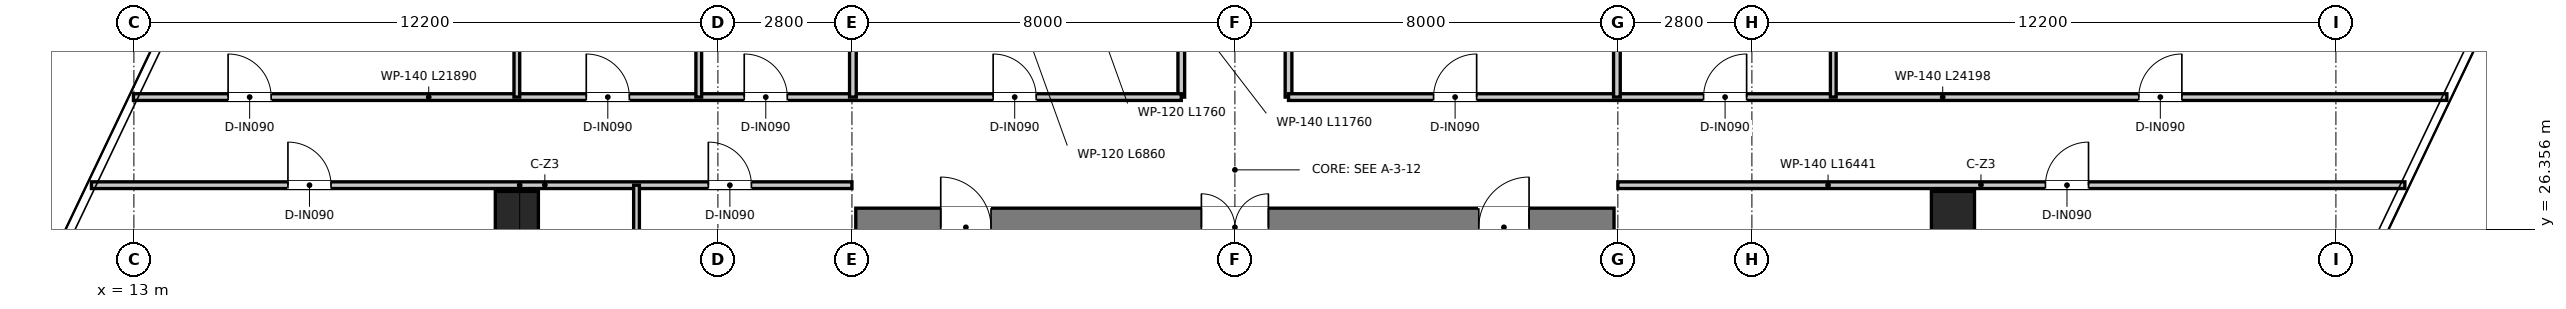
"""IFC4 building model, lengths in metres.
Left out: names, types, materials, properties, quantities, classifications, styles, units other than length and angle.
Written with IfcOpenShell. Run it as: python <this file> out.ifc"""

import sys

from ifc_helpers import new_model, si_unit, direction, frame, frame_2d, origin, origin_2d, place, context, subcontext, project, spatial, rectangle, extrude, source, transform, mapped, element, fill, save


model = new_model("IFC4")
c1 = context("Model", 3, precision=1e-05, world=origin(), true_north=direction((0.0, 1.0)))
c2 = subcontext(c1, "Body", "Model", "MODEL_VIEW")
j1 = project(units=[si_unit("LENGTHUNIT", "METRE"), si_unit("PLANEANGLEUNIT", "RADIAN")], contexts=[c1])
p1 = place(None, origin())
s1 = spatial("IfcSite", under=j1, at=p1, CompositionType="ELEMENT")
p2 = place(p1, origin())
s2 = spatial("IfcBuilding", under=s1, at=p2, CompositionType="ELEMENT")
p3 = place(p2, frame((0.0, 0.0, 146.2)))
s3 = spatial("IfcBuildingStorey", under=s2, at=p3, CompositionType="ELEMENT", Elevation=146.2)
p4 = place(p3, frame((28.08, 26.4, 0.0), z_axis=(0.0, 0.0, 1.0), x_axis=(1.0, 0.0, 0.0)))
e1 = element("IfcWall", 1, at=p4, inside=s3, PredefinedType="SHEAR", context=c2, shape_type="SweptSolid", body=[
    extrude(rectangle(XDim=15.84, YDim=0.8, at=frame_2d((7.92, 0.0))), origin(), (0.0, 0.0, 1.0), 3.95),
])
p5 = place(p4, frame((7.22, 0.0, 0.0)))
e2 = element("IfcOpeningElement", 2, at=p5, cuts=e1, PredefinedType="OPENING", context=c2, shape_type="SweptSolid", body=[
    extrude(rectangle(XDim=1.4, YDim=2.2, at=frame_2d((0.7, 1.1))), frame((0.0, 0.41, 0.0), z_axis=(0.0, -1.0, 0.0), x_axis=(1.0, 0.0, 0.0)), (0.0, 0.0, 1.0), 0.82),
])
p6 = place(p4, frame((1.775, 0.0, 0.0)))
e3 = element("IfcOpeningElement", 3, at=p6, cuts=e1, PredefinedType="OPENING", context=c2, shape_type="SweptSolid", body=[
    extrude(rectangle(XDim=1.05, YDim=2.1, at=frame_2d((0.525, 1.05))), frame((0.0, 0.41, 0.0), z_axis=(0.0, -1.0, 0.0), x_axis=(1.0, 0.0, 0.0)), (0.0, 0.0, 1.0), 0.82),
])
p7 = place(p4, frame((13.015, 0.0, 0.0)))
e4 = element("IfcOpeningElement", 4, at=p7, cuts=e1, PredefinedType="OPENING", context=c2, shape_type="SweptSolid", body=[
    extrude(rectangle(XDim=1.05, YDim=2.1, at=frame_2d((0.525, 1.05))), frame((0.0, 0.41, 0.0), z_axis=(0.0, -1.0, 0.0), x_axis=(1.0, 0.0, 0.0)), (0.0, 0.0, 1.0), 0.82),
])
m1 = source(origin(), c2, "Body", "SweptSolid", [
    extrude(rectangle(XDim=0.9, YDim=0.9, at=origin_2d()), origin(), (0.0, 0.0, 1.0), 3.95),
])
for number, where, z_axis, x_axis in (
    (5, (21.0, 26.7, 0.0), (0.0, 0.0, 1.0), (1.0, 0.0, 0.0)),
    (6, (51.0, 26.7, 0.0), (0.0, 0.0, 1.0), (1.0, 0.0, 0.0)),
):
    element("IfcColumn", number, at=place(p3, frame(where, z_axis=z_axis, x_axis=x_axis)), inside=s3, PredefinedType="COLUMN", context=c2, shape_type="MappedRepresentation", body=[
        mapped(m1, transform((0.0, 0.0, 0.0), x_axis=(1.0, 0.0, 0.0), y_axis=(0.0, 1.0, 0.0), z_axis=(0.0, 0.0, 1.0), scale=1.0)),
    ])
p8 = place(p3, frame((34.88, 29.12, 0.0), z_axis=(0.0, 0.0, 1.0), x_axis=(0.0, 1.0, 0.0)))
e7 = element("IfcWall", 7, at=p8, inside=s3, PredefinedType="PARTITIONING", context=c2, shape_type="SweptSolid", body=[
    extrude(rectangle(XDim=11.76, YDim=0.14, at=frame_2d((5.88, 0.0))), origin(), (0.0, 0.0, 1.0), 3.03),
])
p9 = place(p8, frame((4.085, 0.0, 0.0)))
e8 = element("IfcOpeningElement", 8, at=p9, cuts=e7, PredefinedType="OPENING", context=c2, shape_type="SweptSolid", body=[
    extrude(rectangle(XDim=0.95, YDim=2.1, at=frame_2d((0.475, 1.05))), frame((0.0, 0.08, 0.0), z_axis=(0.0, -1.0, 0.0), x_axis=(1.0, 0.0, 0.0)), (0.0, 0.0, 1.0), 0.16),
])
p10 = place(p8, frame((6.82, 0.0, 0.0)))
e9 = element("IfcOpeningElement", 9, at=p10, cuts=e7, PredefinedType="OPENING", context=c2, shape_type="SweptSolid", body=[
    extrude(rectangle(XDim=0.9, YDim=2.1, at=frame_2d((0.45, 1.05))), frame((0.0, 0.08, 0.0), z_axis=(0.0, -1.0, 0.0), x_axis=(1.0, 0.0, 0.0)), (0.0, 0.0, 1.0), 0.16),
])
p11 = place(p8, frame((9.83, 0.0, 0.0)))
e10 = element("IfcOpeningElement", 10, at=p11, cuts=e7, PredefinedType="OPENING", context=c2, shape_type="SweptSolid", body=[
    extrude(rectangle(XDim=0.9, YDim=2.1, at=frame_2d((0.45, 1.05))), frame((0.0, 0.08, 0.0), z_axis=(0.0, -1.0, 0.0), x_axis=(1.0, 0.0, 0.0)), (0.0, 0.0, 1.0), 0.16),
])
p12 = place(p3, frame((37.12, 29.12, 0.0), z_axis=(0.0, 0.0, 1.0), x_axis=(0.0, 1.0, 0.0)))
e11 = element("IfcWall", 11, at=p12, inside=s3, PredefinedType="PARTITIONING", context=c2, shape_type="SweptSolid", body=[
    extrude(rectangle(XDim=11.76, YDim=0.14, at=frame_2d((5.88, 0.0))), origin(), (0.0, 0.0, 1.0), 3.03),
])
p13 = place(p12, frame((3.205, 0.0, 0.0)))
e12 = element("IfcOpeningElement", 12, at=p13, cuts=e11, PredefinedType="OPENING", context=c2, shape_type="SweptSolid", body=[
    extrude(rectangle(XDim=0.95, YDim=2.1, at=frame_2d((0.475, 1.05))), frame((0.0, 0.08, 0.0), z_axis=(0.0, -1.0, 0.0), x_axis=(1.0, 0.0, 0.0)), (0.0, 0.0, 1.0), 0.16),
])
p14 = place(p12, frame((6.82, 0.0, 0.0)))
e13 = element("IfcOpeningElement", 13, at=p14, cuts=e11, PredefinedType="OPENING", context=c2, shape_type="SweptSolid", body=[
    extrude(rectangle(XDim=0.9, YDim=2.1, at=frame_2d((0.45, 1.05))), frame((0.0, 0.08, 0.0), z_axis=(0.0, -1.0, 0.0), x_axis=(1.0, 0.0, 0.0)), (0.0, 0.0, 1.0), 0.16),
])
p15 = place(p12, frame((9.83, 0.0, 0.0)))
e14 = element("IfcOpeningElement", 14, at=p15, cuts=e11, PredefinedType="OPENING", context=c2, shape_type="SweptSolid", body=[
    extrude(rectangle(XDim=0.9, YDim=2.1, at=frame_2d((0.45, 1.05))), frame((0.0, 0.08, 0.0), z_axis=(0.0, -1.0, 0.0), x_axis=(1.0, 0.0, 0.0)), (0.0, 0.0, 1.0), 0.16),
])
p16 = place(p3, frame((12.99, 29.12, 0.0), z_axis=(0.0, 0.0, 1.0), x_axis=(1.0, 0.0, 0.0)))
e15 = element("IfcWall", 15, at=p16, inside=s3, PredefinedType="PARTITIONING", context=c2, shape_type="SweptSolid", body=[
    extrude(rectangle(XDim=21.889, YDim=0.14, at=frame_2d((10.945, 0.0))), origin(), (0.0, 0.0, 1.0), 3.03),
])
p17 = place(p16, frame((17.96, 0.0, 0.0)))
e16 = element("IfcOpeningElement", 16, at=p17, cuts=e15, PredefinedType="OPENING", context=c2, shape_type="SweptSolid", body=[
    extrude(rectangle(XDim=0.9, YDim=2.1, at=frame_2d((0.45, 1.05))), frame((0.0, 0.08, 0.0), z_axis=(0.0, -1.0, 0.0), x_axis=(1.0, 0.0, 0.0)), (0.0, 0.0, 1.0), 0.16),
])
p18 = place(p16, frame((1.978, 0.0, 0.0)))
e17 = element("IfcOpeningElement", 17, at=p18, cuts=e15, PredefinedType="OPENING", context=c2, shape_type="SweptSolid", body=[
    extrude(rectangle(XDim=0.9, YDim=2.1, at=frame_2d((0.45, 1.05))), frame((0.0, 0.08, 0.0), z_axis=(0.0, -1.0, 0.0), x_axis=(1.0, 0.0, 0.0)), (0.0, 0.0, 1.0), 0.16),
])
p19 = place(p16, frame((9.46, 0.0, 0.0)))
e18 = element("IfcOpeningElement", 18, at=p19, cuts=e15, PredefinedType="OPENING", context=c2, shape_type="SweptSolid", body=[
    extrude(rectangle(XDim=0.9, YDim=2.1, at=frame_2d((0.45, 1.05))), frame((0.0, 0.08, 0.0), z_axis=(0.0, -1.0, 0.0), x_axis=(1.0, 0.0, 0.0)), (0.0, 0.0, 1.0), 0.16),
])
p20 = place(p16, frame((12.76, 0.0, 0.0)))
e19 = element("IfcOpeningElement", 19, at=p20, cuts=e15, PredefinedType="OPENING", context=c2, shape_type="SweptSolid", body=[
    extrude(rectangle(XDim=0.9, YDim=2.1, at=frame_2d((0.45, 1.05))), frame((0.0, 0.08, 0.0), z_axis=(0.0, -1.0, 0.0), x_axis=(1.0, 0.0, 0.0)), (0.0, 0.0, 1.0), 0.16),
])
p21 = place(p3, frame((37.12, 29.12, 0.0), z_axis=(0.0, 0.0, 1.0), x_axis=(1.0, 0.0, 0.0)))
e20 = element("IfcWall", 20, at=p21, inside=s3, PredefinedType="PARTITIONING", context=c2, shape_type="SweptSolid", body=[
    extrude(rectangle(XDim=24.198, YDim=0.14, at=frame_2d((12.099, 0.0))), origin(), (0.0, 0.0, 1.0), 3.03),
])
p22 = place(p21, frame((3.03, 0.0, 0.0)))
e21 = element("IfcOpeningElement", 21, at=p22, cuts=e20, PredefinedType="OPENING", context=c2, shape_type="SweptSolid", body=[
    extrude(rectangle(XDim=0.9, YDim=2.1, at=frame_2d((0.45, 1.05))), frame((0.0, 0.08, 0.0), z_axis=(0.0, -1.0, 0.0), x_axis=(1.0, 0.0, 0.0)), (0.0, 0.0, 1.0), 0.16),
])
p23 = place(p21, frame((8.67, 0.0, 0.0)))
e22 = element("IfcOpeningElement", 22, at=p23, cuts=e20, PredefinedType="OPENING", context=c2, shape_type="SweptSolid", body=[
    extrude(rectangle(XDim=0.9, YDim=2.1, at=frame_2d((0.45, 1.05))), frame((0.0, 0.08, 0.0), z_axis=(0.0, -1.0, 0.0), x_axis=(1.0, 0.0, 0.0)), (0.0, 0.0, 1.0), 0.16),
])
p24 = place(p21, frame((17.762, 0.0, 0.0)))
e23 = element("IfcOpeningElement", 23, at=p24, cuts=e20, PredefinedType="OPENING", context=c2, shape_type="SweptSolid", body=[
    extrude(rectangle(XDim=0.9, YDim=2.1, at=frame_2d((0.45, 1.05))), frame((0.0, 0.08, 0.0), z_axis=(0.0, -1.0, 0.0), x_axis=(1.0, 0.0, 0.0)), (0.0, 0.0, 1.0), 0.16),
])
p25 = place(p3, frame((12.113, 27.28, 0.0), z_axis=(0.0, 0.0, 1.0), x_axis=(1.0, 0.0, 0.0)))
e24 = element("IfcWall", 24, at=p25, inside=s3, PredefinedType="PARTITIONING", context=c2, shape_type="SweptSolid", body=[
    extrude(rectangle(XDim=15.887, YDim=0.14, at=frame_2d((7.944, 0.0))), origin(), (0.0, 0.0, 1.0), 3.03),
])
p26 = place(p25, frame((4.105, 0.0, 0.0)))
e25 = element("IfcOpeningElement", 25, at=p26, cuts=e24, PredefinedType="OPENING", context=c2, shape_type="SweptSolid", body=[
    extrude(rectangle(XDim=0.9, YDim=2.1, at=frame_2d((0.45, 1.05))), frame((0.0, 0.08, 0.0), z_axis=(0.0, -1.0, 0.0), x_axis=(1.0, 0.0, 0.0)), (0.0, 0.0, 1.0), 0.16),
])
p27 = place(p25, frame((12.887, 0.0, 0.0)))
e26 = element("IfcOpeningElement", 26, at=p27, cuts=e24, PredefinedType="OPENING", context=c2, shape_type="SweptSolid", body=[
    extrude(rectangle(XDim=0.9, YDim=2.1, at=frame_2d((0.45, 1.05))), frame((0.0, 0.08, 0.0), z_axis=(0.0, -1.0, 0.0), x_axis=(1.0, 0.0, 0.0)), (0.0, 0.0, 1.0), 0.16),
])
p28 = place(p3, frame((44.0, 27.28, 0.0), z_axis=(0.0, 0.0, 1.0), x_axis=(1.0, 0.0, 0.0)))
e27 = element("IfcWall", 27, at=p28, inside=s3, PredefinedType="PARTITIONING", context=c2, shape_type="SweptSolid", body=[
    extrude(rectangle(XDim=16.441, YDim=0.14, at=frame_2d((8.22, 0.0))), origin(), (0.0, 0.0, 1.0), 3.03),
])
p29 = place(p28, frame((8.932, 0.0, 0.0)))
e28 = element("IfcOpeningElement", 28, at=p29, cuts=e27, PredefinedType="OPENING", context=c2, shape_type="SweptSolid", body=[
    extrude(rectangle(XDim=0.9, YDim=2.1, at=frame_2d((0.45, 1.05))), frame((0.0, 0.08, 0.0), z_axis=(0.0, -1.0, 0.0), x_axis=(1.0, 0.0, 0.0)), (0.0, 0.0, 1.0), 0.16),
])
for number, where, z_axis, x_axis in (
    (29, (28.02, 29.12, 0.0), (0.0, 0.0, 1.0), (0.0, 1.0, 0.0)),
    (30, (43.98, 29.12, 0.0), (0.0, 0.0, 1.0), (0.0, 1.0, 0.0)),
):
    element("IfcWall", number, at=place(p3, frame(where, z_axis=z_axis, x_axis=x_axis)), inside=s3, PredefinedType="PARTITIONING", context=c2, shape_type="SweptSolid", body=[
        extrude(rectangle(XDim=5.46, YDim=0.14, at=frame_2d((2.73, 0.0))), origin(), (0.0, 0.0, 1.0), 3.31),
    ])
p30 = place(p3, frame((21.0, 29.12, 0.0), z_axis=(0.0, 0.0, 1.0), x_axis=(0.0, 1.0, 0.0)))
e31 = element("IfcWall", 31, at=p30, inside=s3, PredefinedType="PARTITIONING", context=c2, shape_type="SweptSolid", body=[
    extrude(rectangle(XDim=16.792, YDim=0.12, at=frame_2d((8.396, 0.0))), origin(), (0.0, 0.0, 1.0), 3.08),
])
p31 = place(p3, frame((24.8, 29.12, 0.0), z_axis=(0.0, 0.0, 1.0), x_axis=(0.0, 1.0, 0.0)))
e32 = element("IfcWall", 32, at=p31, inside=s3, PredefinedType="PARTITIONING", context=c2, shape_type="SweptSolid", body=[
    extrude(rectangle(XDim=21.951, YDim=0.12, at=frame_2d((10.975, 0.0))), origin(), (0.0, 0.0, 1.0), 3.08),
])
p32 = place(p3, frame((48.5, 29.12, 0.0), z_axis=(0.0, 0.0, 1.0), x_axis=(0.0, 1.0, 0.0)))
e33 = element("IfcWall", 33, at=p32, inside=s3, PredefinedType="PARTITIONING", context=c2, shape_type="SweptSolid", body=[
    extrude(rectangle(XDim=15.781, YDim=0.12, at=frame_2d((7.891, 0.0))), origin(), (0.0, 0.0, 1.0), 3.08),
])
p33 = place(p3, frame((23.5, 8.498, 0.0), z_axis=(0.0, 0.0, 1.0), x_axis=(0.0, 1.0, 0.0)))
e34 = element("IfcWall", 34, at=p33, inside=s3, PredefinedType="PARTITIONING", context=c2, shape_type="SweptSolid", body=[
    extrude(rectangle(XDim=18.782, YDim=0.12, at=frame_2d((9.391, 0.0))), origin(), (0.0, 0.0, 1.0), 3.08),
])
p34 = place(p5, origin())
e35 = element("IfcDoor", 35, at=p34, inside=s3, OperationType="DOUBLE_DOOR_SINGLE_SWING", PredefinedType="DOOR", context=c2, shape_type="SweptSolid", body=[
    extrude(rectangle(XDim=1.4, YDim=2.2, at=frame_2d((0.7, 1.1))), frame((0.0, 0.025, 0.0), z_axis=(0.0, -1.0, 0.0), x_axis=(1.0, 0.0, 0.0)), (0.0, 0.0, 1.0), 0.05),
])
fill(e2, e35)
p35 = place(p6, origin())
e36 = element("IfcDoor", 36, at=p35, inside=s3, OperationType="SINGLE_SWING_LEFT", PredefinedType="DOOR", context=c2, shape_type="SweptSolid", body=[
    extrude(rectangle(XDim=1.05, YDim=2.1, at=frame_2d((0.525, 1.05))), frame((0.0, 0.025, 0.0), z_axis=(0.0, -1.0, 0.0), x_axis=(1.0, 0.0, 0.0)), (0.0, 0.0, 1.0), 0.05),
])
fill(e3, e36)
p36 = place(p7, origin())
e37 = element("IfcDoor", 37, at=p36, inside=s3, OperationType="SINGLE_SWING_RIGHT", PredefinedType="DOOR", context=c2, shape_type="SweptSolid", body=[
    extrude(rectangle(XDim=1.05, YDim=2.1, at=frame_2d((0.525, 1.05))), frame((0.0, 0.025, 0.0), z_axis=(0.0, -1.0, 0.0), x_axis=(1.0, 0.0, 0.0)), (0.0, 0.0, 1.0), 0.05),
])
fill(e4, e37)
p37 = place(p17, origin())
e38 = element("IfcDoor", 38, at=p37, inside=s3, OperationType="SINGLE_SWING_LEFT", PredefinedType="DOOR", context=c2, shape_type="SweptSolid", body=[
    extrude(rectangle(XDim=0.9, YDim=2.1, at=frame_2d((0.45, 1.05))), frame((0.0, 0.025, 0.0), z_axis=(0.0, -1.0, 0.0), x_axis=(1.0, 0.0, 0.0)), (0.0, 0.0, 1.0), 0.05),
])
fill(e16, e38)
p38 = place(p22, origin())
e39 = element("IfcDoor", 39, at=p38, inside=s3, OperationType="SINGLE_SWING_RIGHT", PredefinedType="DOOR", context=c2, shape_type="SweptSolid", body=[
    extrude(rectangle(XDim=0.9, YDim=2.1, at=frame_2d((0.45, 1.05))), frame((0.0, 0.025, 0.0), z_axis=(0.0, -1.0, 0.0), x_axis=(1.0, 0.0, 0.0)), (0.0, 0.0, 1.0), 0.05),
])
fill(e21, e39)
p39 = place(p18, origin())
e40 = element("IfcDoor", 40, at=p39, inside=s3, OperationType="SINGLE_SWING_LEFT", PredefinedType="DOOR", context=c2, shape_type="SweptSolid", body=[
    extrude(rectangle(XDim=0.9, YDim=2.1, at=frame_2d((0.45, 1.05))), frame((0.0, 0.025, 0.0), z_axis=(0.0, -1.0, 0.0), x_axis=(1.0, 0.0, 0.0)), (0.0, 0.0, 1.0), 0.05),
])
fill(e17, e40)
p40 = place(p19, origin())
e41 = element("IfcDoor", 41, at=p40, inside=s3, OperationType="SINGLE_SWING_LEFT", PredefinedType="DOOR", context=c2, shape_type="SweptSolid", body=[
    extrude(rectangle(XDim=0.9, YDim=2.1, at=frame_2d((0.45, 1.05))), frame((0.0, 0.025, 0.0), z_axis=(0.0, -1.0, 0.0), x_axis=(1.0, 0.0, 0.0)), (0.0, 0.0, 1.0), 0.05),
])
fill(e18, e41)
p41 = place(p20, origin())
e42 = element("IfcDoor", 42, at=p41, inside=s3, OperationType="SINGLE_SWING_LEFT", PredefinedType="DOOR", context=c2, shape_type="SweptSolid", body=[
    extrude(rectangle(XDim=0.9, YDim=2.1, at=frame_2d((0.45, 1.05))), frame((0.0, 0.025, 0.0), z_axis=(0.0, -1.0, 0.0), x_axis=(1.0, 0.0, 0.0)), (0.0, 0.0, 1.0), 0.05),
])
fill(e19, e42)
p42 = place(p23, origin())
e43 = element("IfcDoor", 43, at=p42, inside=s3, OperationType="SINGLE_SWING_RIGHT", PredefinedType="DOOR", context=c2, shape_type="SweptSolid", body=[
    extrude(rectangle(XDim=0.9, YDim=2.1, at=frame_2d((0.45, 1.05))), frame((0.0, 0.025, 0.0), z_axis=(0.0, -1.0, 0.0), x_axis=(1.0, 0.0, 0.0)), (0.0, 0.0, 1.0), 0.05),
])
fill(e22, e43)
p43 = place(p24, origin())
e44 = element("IfcDoor", 44, at=p43, inside=s3, OperationType="SINGLE_SWING_RIGHT", PredefinedType="DOOR", context=c2, shape_type="SweptSolid", body=[
    extrude(rectangle(XDim=0.9, YDim=2.1, at=frame_2d((0.45, 1.05))), frame((0.0, 0.025, 0.0), z_axis=(0.0, -1.0, 0.0), x_axis=(1.0, 0.0, 0.0)), (0.0, 0.0, 1.0), 0.05),
])
fill(e23, e44)
p44 = place(p26, origin())
e45 = element("IfcDoor", 45, at=p44, inside=s3, OperationType="SINGLE_SWING_LEFT", PredefinedType="DOOR", context=c2, shape_type="SweptSolid", body=[
    extrude(rectangle(XDim=0.9, YDim=2.1, at=frame_2d((0.45, 1.05))), frame((0.0, 0.025, 0.0), z_axis=(0.0, -1.0, 0.0), x_axis=(1.0, 0.0, 0.0)), (0.0, 0.0, 1.0), 0.05),
])
fill(e25, e45)
p45 = place(p27, origin())
e46 = element("IfcDoor", 46, at=p45, inside=s3, OperationType="SINGLE_SWING_LEFT", PredefinedType="DOOR", context=c2, shape_type="SweptSolid", body=[
    extrude(rectangle(XDim=0.9, YDim=2.1, at=frame_2d((0.45, 1.05))), frame((0.0, 0.025, 0.0), z_axis=(0.0, -1.0, 0.0), x_axis=(1.0, 0.0, 0.0)), (0.0, 0.0, 1.0), 0.05),
])
fill(e26, e46)
p46 = place(p29, origin())
e47 = element("IfcDoor", 47, at=p46, inside=s3, OperationType="SINGLE_SWING_RIGHT", PredefinedType="DOOR", context=c2, shape_type="SweptSolid", body=[
    extrude(rectangle(XDim=0.9, YDim=2.1, at=frame_2d((0.45, 1.05))), frame((0.0, 0.025, 0.0), z_axis=(0.0, -1.0, 0.0), x_axis=(1.0, 0.0, 0.0)), (0.0, 0.0, 1.0), 0.05),
])
fill(e28, e47)
save(model, sys.argv[1])
